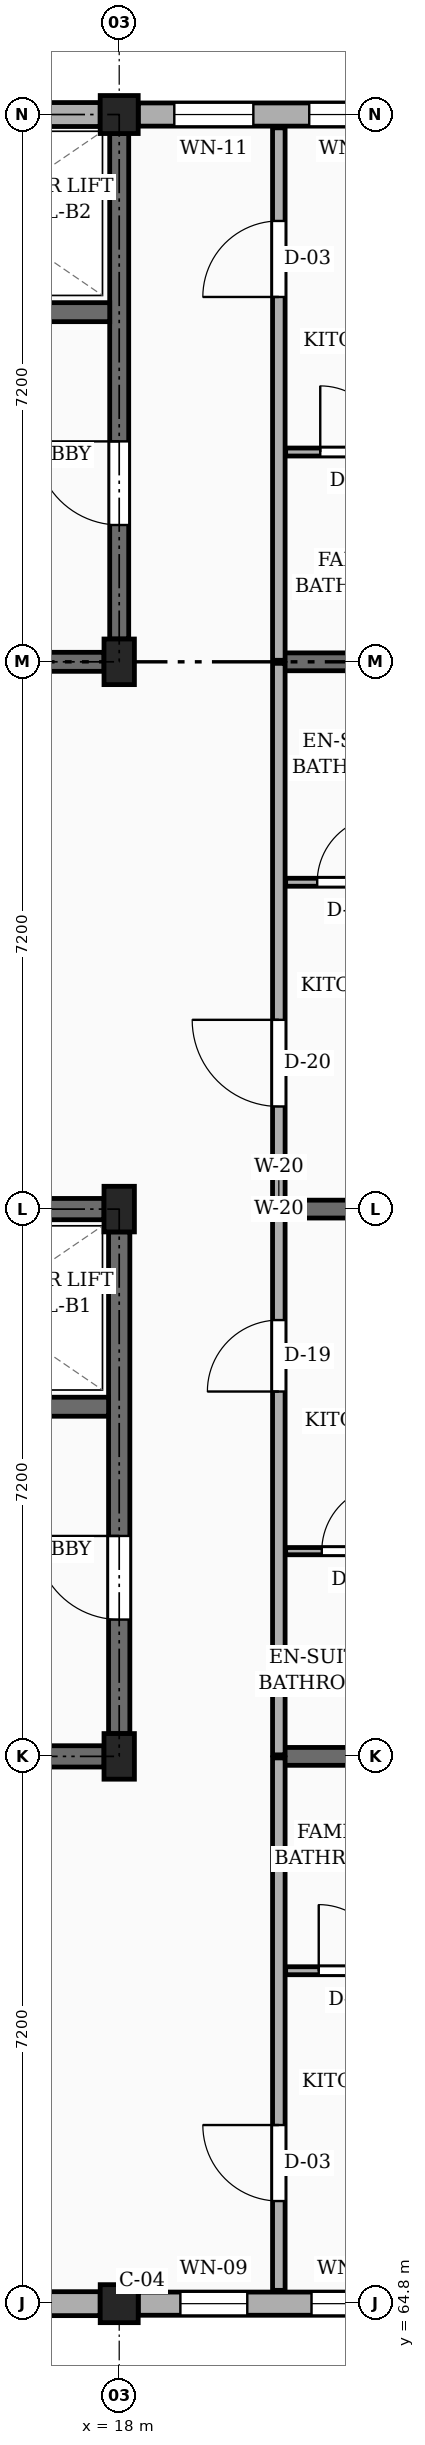
"""IFC4 building model, lengths in metres.
Left out: names, types, materials, properties, quantities, classifications, styles, units other than length and angle.
Written with IfcOpenShell. Run it as: python <this file> out.ifc"""

import sys

from ifc_helpers import new_model, si_unit, direction, frame, frame_2d, origin, origin_2d, place, context, subcontext, project, spatial, rectangle, extrude, element, fill, save


model = new_model("IFC4")
c1 = context("Model", 3, precision=1e-05, world=origin(), true_north=direction((0.0, 1.0)))
c2 = subcontext(c1, "Body", "Model", "MODEL_VIEW")
j1 = project(units=[si_unit("LENGTHUNIT", "METRE"), si_unit("PLANEANGLEUNIT", "RADIAN")], contexts=[c1])
p1 = place(None, origin())
s1 = spatial("IfcSite", under=j1, at=p1, CompositionType="ELEMENT")
p2 = place(p1, origin())
s2 = spatial("IfcBuilding", under=s1, at=p2, CompositionType="ELEMENT")
p3 = place(p2, frame((0.0, 0.0, 23.4)))
s3 = spatial("IfcBuildingStorey", under=s2, at=p3, CompositionType="ELEMENT", Elevation=23.4)
p4 = place(p3, frame((18.0, 64.8, 0.0), z_axis=(0.0, 0.0, 1.0), x_axis=(1.0, 0.0, 0.0)))
e1 = element("IfcColumn", 1, at=p4, inside=s3, PredefinedType="COLUMN", context=c2, shape_type="SweptSolid", body=[
    extrude(rectangle(XDim=0.5, YDim=0.5, at=origin_2d()), origin(), (0.0, 0.0, 1.0), 3.15),
])
for number, where, z_axis, x_axis in (
    (2, (18.0, 72.0, 0.0), (0.0, 0.0, 1.0), (1.0, 0.0, 0.0)),
    (3, (18.0, 79.2, 0.0), (0.0, 0.0, 1.0), (1.0, 0.0, 0.0)),
    (4, (18.0, 86.4, 0.0), (0.0, 0.0, 1.0), (1.0, 0.0, 0.0)),
):
    element("IfcColumn", number, at=place(p3, frame(where, z_axis=z_axis, x_axis=x_axis)), inside=s3, PredefinedType="COLUMN", context=c2, shape_type="SweptSolid", body=[
        extrude(rectangle(XDim=0.4, YDim=0.6, at=origin_2d()), origin(), (0.0, 0.0, 1.0), 3.15),
    ])
p5 = place(p3, frame((18.0, 93.6, 0.0), z_axis=(0.0, 0.0, 1.0), x_axis=(1.0, 0.0, 0.0)))
e5 = element("IfcColumn", 5, at=p5, inside=s3, PredefinedType="COLUMN", context=c2, shape_type="SweptSolid", body=[
    extrude(rectangle(XDim=0.5, YDim=0.5, at=origin_2d()), origin(), (0.0, 0.0, 1.0), 3.15),
])
for number, where, z_axis, x_axis in (
    (6, (20.1, 72.0, 0.0), (0.0, 0.0, 1.0), (1.0, 0.0, 0.0)),
    (7, (20.1, 79.2, 0.0), (0.0, 0.0, 1.0), (1.0, 0.0, 0.0)),
    (8, (20.1, 86.4, 0.0), (0.0, 0.0, 1.0), (1.0, 0.0, 0.0)),
):
    element("IfcWall", number, at=place(p3, frame(where, z_axis=z_axis, x_axis=x_axis)), inside=s3, PredefinedType="SOLIDWALL", context=c2, shape_type="SweptSolid", body=[
        extrude(rectangle(XDim=4.85, YDim=0.235, at=frame_2d((2.425, 0.0))), origin(), (0.0, 0.0, 1.0), 2.21),
    ])
p6 = place(p3, frame((11.05, 64.8, 0.0), z_axis=(0.0, 0.0, 1.0), x_axis=(1.0, 0.0, 0.0)))
e9 = element("IfcWall", 9, at=p6, inside=s3, PredefinedType="SOLIDWALL", context=c2, shape_type="SweptSolid", body=[
    extrude(rectangle(XDim=6.7, YDim=0.315, at=frame_2d((3.35, 0.0))), origin(), (0.0, 0.0, 1.0), 2.48),
])
p7 = place(p6, frame((0.45, 0.0, 0.78)))
e10 = element("IfcOpeningElement", 10, at=p7, cuts=e9, PredefinedType="OPENING", context=c2, shape_type="SweptSolid", body=[
    extrude(rectangle(XDim=1.32, YDim=1.15, at=frame_2d((0.66, 0.575))), frame((0.0, 0.167, 0.0), z_axis=(0.0, -1.0, 0.0), x_axis=(1.0, 0.0, 0.0)), (0.0, 0.0, 1.0), 0.335),
])
p8 = place(p6, frame((4.65, 0.0, 0.78)))
e11 = element("IfcOpeningElement", 11, at=p8, cuts=e9, PredefinedType="OPENING", context=c2, shape_type="SweptSolid", body=[
    extrude(rectangle(XDim=0.88, YDim=1.26, at=frame_2d((0.44, 0.63))), frame((0.0, 0.167, 0.0), z_axis=(0.0, -1.0, 0.0), x_axis=(1.0, 0.0, 0.0)), (0.0, 0.0, 1.0), 0.335),
])
p9 = place(p3, frame((18.25, 64.8, 0.0), z_axis=(0.0, 0.0, 1.0), x_axis=(1.0, 0.0, 0.0)))
e12 = element("IfcWall", 12, at=p9, inside=s3, PredefinedType="SOLIDWALL", context=c2, shape_type="SweptSolid", body=[
    extrude(rectangle(XDim=6.7, YDim=0.305, at=frame_2d((3.35, 0.0))), origin(), (0.0, 0.0, 1.0), 2.48),
])
p10 = place(p9, frame((0.555, 0.0, 0.78)))
e13 = element("IfcOpeningElement", 13, at=p10, cuts=e12, PredefinedType="OPENING", context=c2, shape_type="SweptSolid", body=[
    extrude(rectangle(XDim=0.88, YDim=1.26, at=frame_2d((0.44, 0.63))), frame((0.0, 0.163, 0.0), z_axis=(0.0, -1.0, 0.0), x_axis=(1.0, 0.0, 0.0)), (0.0, 0.0, 1.0), 0.325),
])
p11 = place(p9, frame((2.28, 0.0, 0.78)))
e14 = element("IfcOpeningElement", 14, at=p11, cuts=e12, PredefinedType="OPENING", context=c2, shape_type="SweptSolid", body=[
    extrude(rectangle(XDim=1.04, YDim=1.26, at=frame_2d((0.52, 0.63))), frame((0.0, 0.163, 0.0), z_axis=(0.0, -1.0, 0.0), x_axis=(1.0, 0.0, 0.0)), (0.0, 0.0, 1.0), 0.325),
])
p12 = place(p9, frame((4.555, 0.0, 0.78)))
e15 = element("IfcOpeningElement", 15, at=p12, cuts=e12, PredefinedType="OPENING", context=c2, shape_type="SweptSolid", body=[
    extrude(rectangle(XDim=1.2, YDim=1.26, at=frame_2d((0.6, 0.63))), frame((0.0, 0.163, 0.0), z_axis=(0.0, -1.0, 0.0), x_axis=(1.0, 0.0, 0.0)), (0.0, 0.0, 1.0), 0.325),
])
p13 = place(p3, frame((24.95, 93.6, 0.0), z_axis=(0.0, 0.0, 1.0), x_axis=(-1.0, 0.0, 0.0)))
e16 = element("IfcWall", 16, at=p13, inside=s3, PredefinedType="SOLIDWALL", context=c2, shape_type="SweptSolid", body=[
    extrude(rectangle(XDim=6.7, YDim=0.305, at=frame_2d((3.35, 0.0))), origin(), (0.0, 0.0, 1.0), 2.48),
])
p14 = place(p13, frame((1.035, 0.0, 0.78)))
e17 = element("IfcOpeningElement", 17, at=p14, cuts=e16, PredefinedType="OPENING", context=c2, shape_type="SweptSolid", body=[
    extrude(rectangle(XDim=0.98, YDim=1.36, at=frame_2d((0.49, 0.68))), frame((0.0, 0.163, 0.0), z_axis=(0.0, -1.0, 0.0), x_axis=(1.0, 0.0, 0.0)), (0.0, 0.0, 1.0), 0.325),
])
p15 = place(p13, frame((3.31, 0.0, 0.78)))
e18 = element("IfcOpeningElement", 18, at=p15, cuts=e16, PredefinedType="OPENING", context=c2, shape_type="SweptSolid", body=[
    extrude(rectangle(XDim=1.14, YDim=1.36, at=frame_2d((0.57, 0.68))), frame((0.0, 0.163, 0.0), z_axis=(0.0, -1.0, 0.0), x_axis=(1.0, 0.0, 0.0)), (0.0, 0.0, 1.0), 0.325),
])
p16 = place(p13, frame((5.185, 0.0, 0.78)))
e19 = element("IfcOpeningElement", 19, at=p16, cuts=e16, PredefinedType="OPENING", context=c2, shape_type="SweptSolid", body=[
    extrude(rectangle(XDim=1.04, YDim=1.26, at=frame_2d((0.52, 0.63))), frame((0.0, 0.163, 0.0), z_axis=(0.0, -1.0, 0.0), x_axis=(1.0, 0.0, 0.0)), (0.0, 0.0, 1.0), 0.325),
])
p17 = place(p3, frame((17.75, 93.6, 0.0), z_axis=(0.0, 0.0, 1.0), x_axis=(-1.0, 0.0, 0.0)))
e20 = element("IfcWall", 20, at=p17, inside=s3, PredefinedType="SOLIDWALL", context=c2, shape_type="SweptSolid", body=[
    extrude(rectangle(XDim=6.7, YDim=0.315, at=frame_2d((3.35, 0.0))), origin(), (0.0, 0.0, 1.0), 2.48),
])
p18 = place(p17, frame((2.925, 0.0, 0.9)))
e21 = element("IfcOpeningElement", 21, at=p18, cuts=e20, PredefinedType="OPENING", context=c2, shape_type="SweptSolid", body=[
    extrude(rectangle(XDim=0.85, YDim=1.15, at=frame_2d((0.425, 0.575))), frame((0.0, 0.167, 0.0), z_axis=(0.0, -1.0, 0.0), x_axis=(1.0, 0.0, 0.0)), (0.0, 0.0, 1.0), 0.335),
])
p19 = place(p3, frame((11.0, 79.2, 0.0), z_axis=(0.0, 0.0, 1.0), x_axis=(1.0, 0.0, 0.0)))
e22 = element("IfcWall", 22, at=p19, inside=s3, PredefinedType="SHEAR", context=c2, shape_type="SweptSolid", body=[
    extrude(rectangle(XDim=6.8, YDim=0.28, at=frame_2d((3.4, 0.0))), origin(), (0.0, 0.0, 1.0), 2.91),
])
p20 = place(p3, frame((18.0, 72.3, 0.0), z_axis=(0.0, 0.0, 1.0), x_axis=(0.0, 1.0, 0.0)))
e23 = element("IfcWall", 23, at=p20, inside=s3, PredefinedType="SHEAR", context=c2, shape_type="SweptSolid", body=[
    extrude(rectangle(XDim=6.6, YDim=0.28, at=frame_2d((3.3, 0.0))), origin(), (0.0, 0.0, 1.0), 2.91),
])
p21 = place(p20, frame((1.5, 0.0, 0.0)))
e24 = element("IfcOpeningElement", 24, at=p21, cuts=e23, PredefinedType="OPENING", context=c2, shape_type="SweptSolid", body=[
    extrude(rectangle(XDim=1.1, YDim=2.15, at=frame_2d((0.55, 1.075))), frame((0.0, 0.15, 0.0), z_axis=(0.0, -1.0, 0.0), x_axis=(1.0, 0.0, 0.0)), (0.0, 0.0, 1.0), 0.3),
])
p22 = place(p3, frame((11.0, 72.0, 0.0), z_axis=(0.0, 0.0, 1.0), x_axis=(1.0, 0.0, 0.0)))
e25 = element("IfcWall", 25, at=p22, inside=s3, PredefinedType="SHEAR", context=c2, shape_type="SweptSolid", body=[
    extrude(rectangle(XDim=6.8, YDim=0.28, at=frame_2d((3.4, 0.0))), origin(), (0.0, 0.0, 1.0), 2.91),
])
p23 = place(p3, frame((14.525, 76.6, 0.0), z_axis=(0.0, 0.0, 1.0), x_axis=(1.0, 0.0, 0.0)))
e26 = element("IfcWall", 26, at=p23, inside=s3, PredefinedType="SHEAR", context=c2, shape_type="SweptSolid", body=[
    extrude(rectangle(XDim=3.335, YDim=0.25, at=frame_2d((1.667, 0.0))), origin(), (0.0, 0.0, 1.0), 2.91),
])
p24 = place(p23, frame((1.1, 0.0, 0.0)))
e27 = element("IfcOpeningElement", 27, at=p24, cuts=e26, PredefinedType="OPENING", context=c2, shape_type="SweptSolid", body=[
    extrude(rectangle(XDim=1.0, YDim=2.2, at=frame_2d((0.5, 1.1))), frame((0.0, 0.135, 0.0), z_axis=(0.0, -1.0, 0.0), x_axis=(1.0, 0.0, 0.0)), (0.0, 0.0, 1.0), 0.27),
])
p25 = place(p3, frame((18.0, 86.7, 0.0), z_axis=(0.0, 0.0, 1.0), x_axis=(0.0, 1.0, 0.0)))
e28 = element("IfcWall", 28, at=p25, inside=s3, PredefinedType="SHEAR", context=c2, shape_type="SweptSolid", body=[
    extrude(rectangle(XDim=6.65, YDim=0.25, at=frame_2d((3.325, 0.0))), origin(), (0.0, 0.0, 1.0), 2.91),
])
p26 = place(p25, frame((1.5, 0.0, 0.0)))
e29 = element("IfcOpeningElement", 29, at=p26, cuts=e28, PredefinedType="OPENING", context=c2, shape_type="SweptSolid", body=[
    extrude(rectangle(XDim=1.1, YDim=2.15, at=frame_2d((0.55, 1.075))), frame((0.0, 0.135, 0.0), z_axis=(0.0, -1.0, 0.0), x_axis=(1.0, 0.0, 0.0)), (0.0, 0.0, 1.0), 0.27),
])
p27 = place(p3, frame((11.0, 86.4, 0.0), z_axis=(0.0, 0.0, 1.0), x_axis=(1.0, 0.0, 0.0)))
e30 = element("IfcWall", 30, at=p27, inside=s3, PredefinedType="SHEAR", context=c2, shape_type="SweptSolid", body=[
    extrude(rectangle(XDim=6.8, YDim=0.25, at=frame_2d((3.4, 0.0))), origin(), (0.0, 0.0, 1.0), 2.91),
])
p28 = place(p3, frame((14.525, 91.0, 0.0), z_axis=(0.0, 0.0, 1.0), x_axis=(1.0, 0.0, 0.0)))
e31 = element("IfcWall", 31, at=p28, inside=s3, PredefinedType="SHEAR", context=c2, shape_type="SweptSolid", body=[
    extrude(rectangle(XDim=3.35, YDim=0.25, at=frame_2d((1.675, 0.0))), origin(), (0.0, 0.0, 1.0), 2.91),
])
p29 = place(p28, frame((1.1, 0.0, 0.0)))
e32 = element("IfcOpeningElement", 32, at=p29, cuts=e31, PredefinedType="OPENING", context=c2, shape_type="SweptSolid", body=[
    extrude(rectangle(XDim=1.0, YDim=2.2, at=frame_2d((0.5, 1.1))), frame((0.0, 0.135, 0.0), z_axis=(0.0, -1.0, 0.0), x_axis=(1.0, 0.0, 0.0)), (0.0, 0.0, 1.0), 0.27),
])
p30 = place(p3, frame((20.1, 64.975, 0.0), z_axis=(0.0, 0.0, 1.0), x_axis=(0.0, 1.0, 0.0)))
e33 = element("IfcWall", 33, at=p30, inside=s3, PredefinedType="PARTITIONING", context=c2, shape_type="SweptSolid", body=[
    extrude(rectangle(XDim=7.005, YDim=0.165, at=frame_2d((3.502, 0.0))), origin(), (0.0, 0.0, 1.0), 2.345),
])
p31 = place(p30, frame((1.175, 0.0, 0.0)))
e34 = element("IfcOpeningElement", 34, at=p31, cuts=e33, PredefinedType="OPENING", context=c2, shape_type="SweptSolid", body=[
    extrude(rectangle(XDim=1.0, YDim=2.15, at=frame_2d((0.5, 1.075))), frame((0.0, 0.093, 0.0), z_axis=(0.0, -1.0, 0.0), x_axis=(1.0, 0.0, 0.0)), (0.0, 0.0, 1.0), 0.185),
])
p32 = place(p3, frame((20.1, 72.02, 0.0), z_axis=(0.0, 0.0, 1.0), x_axis=(0.0, 1.0, 0.0)))
e35 = element("IfcWall", 35, at=p32, inside=s3, PredefinedType="PARTITIONING", context=c2, shape_type="SweptSolid", body=[
    extrude(rectangle(XDim=7.16, YDim=0.165, at=frame_2d((3.58, 0.0))), origin(), (0.0, 0.0, 1.0), 2.345),
])
p33 = place(p32, frame((4.78, 0.0, 0.0)))
e36 = element("IfcOpeningElement", 36, at=p33, cuts=e35, PredefinedType="OPENING", context=c2, shape_type="SweptSolid", body=[
    extrude(rectangle(XDim=0.94, YDim=2.12, at=frame_2d((0.47, 1.06))), frame((0.0, 0.093, 0.0), z_axis=(0.0, -1.0, 0.0), x_axis=(1.0, 0.0, 0.0)), (0.0, 0.0, 1.0), 0.185),
])
p34 = place(p3, frame((20.1, 79.22, 0.0), z_axis=(0.0, 0.0, 1.0), x_axis=(0.0, 1.0, 0.0)))
e37 = element("IfcWall", 37, at=p34, inside=s3, PredefinedType="PARTITIONING", context=c2, shape_type="SweptSolid", body=[
    extrude(rectangle(XDim=7.16, YDim=0.165, at=frame_2d((3.58, 0.0))), origin(), (0.0, 0.0, 1.0), 2.345),
])
p35 = place(p34, frame((1.33, 0.0, 0.0)))
e38 = element("IfcOpeningElement", 38, at=p35, cuts=e37, PredefinedType="OPENING", context=c2, shape_type="SweptSolid", body=[
    extrude(rectangle(XDim=1.14, YDim=2.18, at=frame_2d((0.57, 1.09))), frame((0.0, 0.093, 0.0), z_axis=(0.0, -1.0, 0.0), x_axis=(1.0, 0.0, 0.0)), (0.0, 0.0, 1.0), 0.185),
])
p36 = place(p3, frame((20.1, 86.42, 0.0), z_axis=(0.0, 0.0, 1.0), x_axis=(0.0, 1.0, 0.0)))
e39 = element("IfcWall", 39, at=p36, inside=s3, PredefinedType="PARTITIONING", context=c2, shape_type="SweptSolid", body=[
    extrude(rectangle(XDim=7.005, YDim=0.165, at=frame_2d((3.502, 0.0))), origin(), (0.0, 0.0, 1.0), 2.345),
])
p37 = place(p36, frame((4.78, 0.0, 0.0)))
e40 = element("IfcOpeningElement", 40, at=p37, cuts=e39, PredefinedType="OPENING", context=c2, shape_type="SweptSolid", body=[
    extrude(rectangle(XDim=1.0, YDim=2.15, at=frame_2d((0.5, 1.075))), frame((0.0, 0.093, 0.0), z_axis=(0.0, -1.0, 0.0), x_axis=(1.0, 0.0, 0.0)), (0.0, 0.0, 1.0), 0.185),
])
p38 = place(p3, frame((20.19, 69.18, 0.0), z_axis=(0.0, 0.0, 1.0), x_axis=(1.0, 0.0, 0.0)))
e41 = element("IfcWall", 41, at=p38, inside=s3, PredefinedType="PARTITIONING", context=c2, shape_type="SweptSolid", body=[
    extrude(rectangle(XDim=1.74, YDim=0.105, at=frame_2d((0.87, 0.0))), origin(), (0.0, 0.0, 1.0), 2.345),
])
p39 = place(p38, frame((0.435, 0.0, 0.0)))
e42 = element("IfcOpeningElement", 42, at=p39, cuts=e41, PredefinedType="OPENING", context=c2, shape_type="SweptSolid", body=[
    extrude(rectangle(XDim=0.87, YDim=2.05, at=frame_2d((0.435, 1.025))), frame((0.0, 0.062, 0.0), z_axis=(0.0, -1.0, 0.0), x_axis=(1.0, 0.0, 0.0)), (0.0, 0.0, 1.0), 0.125),
])
p40 = place(p3, frame((20.19, 74.7, 0.0), z_axis=(0.0, 0.0, 1.0), x_axis=(1.0, 0.0, 0.0)))
e43 = element("IfcWall", 43, at=p40, inside=s3, PredefinedType="PARTITIONING", context=c2, shape_type="SweptSolid", body=[
    extrude(rectangle(XDim=1.82, YDim=0.095, at=frame_2d((0.91, 0.0))), origin(), (0.0, 0.0, 1.0), 2.345),
])
p41 = place(p40, frame((0.475, 0.0, 0.0)))
e44 = element("IfcOpeningElement", 44, at=p41, cuts=e43, PredefinedType="OPENING", context=c2, shape_type="SweptSolid", body=[
    extrude(rectangle(XDim=0.87, YDim=2.05, at=frame_2d((0.435, 1.025))), frame((0.0, 0.058, 0.0), z_axis=(0.0, -1.0, 0.0), x_axis=(1.0, 0.0, 0.0)), (0.0, 0.0, 1.0), 0.115),
])
p42 = place(p3, frame((20.19, 83.5, 0.0), z_axis=(0.0, 0.0, 1.0), x_axis=(1.0, 0.0, 0.0)))
e45 = element("IfcWall", 45, at=p42, inside=s3, PredefinedType="PARTITIONING", context=c2, shape_type="SweptSolid", body=[
    extrude(rectangle(XDim=1.7, YDim=0.105, at=frame_2d((0.85, 0.0))), origin(), (0.0, 0.0, 1.0), 2.345),
])
p43 = place(p42, frame((0.415, 0.0, 0.0)))
e46 = element("IfcOpeningElement", 46, at=p43, cuts=e45, PredefinedType="OPENING", context=c2, shape_type="SweptSolid", body=[
    extrude(rectangle(XDim=0.87, YDim=2.05, at=frame_2d((0.435, 1.025))), frame((0.0, 0.062, 0.0), z_axis=(0.0, -1.0, 0.0), x_axis=(1.0, 0.0, 0.0)), (0.0, 0.0, 1.0), 0.125),
])
p44 = place(p3, frame((20.19, 89.16, 0.0), z_axis=(0.0, 0.0, 1.0), x_axis=(1.0, 0.0, 0.0)))
e47 = element("IfcWall", 47, at=p44, inside=s3, PredefinedType="PARTITIONING", context=c2, shape_type="SweptSolid", body=[
    extrude(rectangle(XDim=1.78, YDim=0.105, at=frame_2d((0.89, 0.0))), origin(), (0.0, 0.0, 1.0), 2.345),
])
p45 = place(p44, frame((0.455, 0.0, 0.0)))
e48 = element("IfcOpeningElement", 48, at=p45, cuts=e47, PredefinedType="OPENING", context=c2, shape_type="SweptSolid", body=[
    extrude(rectangle(XDim=0.87, YDim=2.05, at=frame_2d((0.435, 1.025))), frame((0.0, 0.062, 0.0), z_axis=(0.0, -1.0, 0.0), x_axis=(1.0, 0.0, 0.0)), (0.0, 0.0, 1.0), 0.125),
])
p46 = place(p10, origin())
e49 = element("IfcWindow", 49, at=p46, inside=s3, PartitioningType="SINGLE_PANEL", PredefinedType="WINDOW", context=c2, shape_type="SweptSolid", body=[
    extrude(rectangle(XDim=0.88, YDim=1.26, at=frame_2d((0.44, 0.63))), frame((0.0, 0.03, 0.0), z_axis=(0.0, -1.0, 0.0), x_axis=(1.0, 0.0, 0.0)), (0.0, 0.0, 1.0), 0.06),
])
fill(e13, e49)
p47 = place(p11, origin())
e50 = element("IfcWindow", 50, at=p47, inside=s3, PartitioningType="SINGLE_PANEL", PredefinedType="WINDOW", context=c2, shape_type="SweptSolid", body=[
    extrude(rectangle(XDim=1.04, YDim=1.26, at=frame_2d((0.52, 0.63))), frame((0.0, 0.03, 0.0), z_axis=(0.0, -1.0, 0.0), x_axis=(1.0, 0.0, 0.0)), (0.0, 0.0, 1.0), 0.06),
])
fill(e14, e50)
p48 = place(p15, origin())
e51 = element("IfcWindow", 51, at=p48, inside=s3, PartitioningType="SINGLE_PANEL", PredefinedType="WINDOW", context=c2, shape_type="SweptSolid", body=[
    extrude(rectangle(XDim=1.14, YDim=1.36, at=frame_2d((0.57, 0.68))), frame((0.0, 0.03, 0.0), z_axis=(0.0, -1.0, 0.0), x_axis=(1.0, 0.0, 0.0)), (0.0, 0.0, 1.0), 0.06),
])
fill(e18, e51)
p49 = place(p16, origin())
e52 = element("IfcWindow", 52, at=p49, inside=s3, PartitioningType="SINGLE_PANEL", PredefinedType="WINDOW", context=c2, shape_type="SweptSolid", body=[
    extrude(rectangle(XDim=1.04, YDim=1.26, at=frame_2d((0.52, 0.63))), frame((0.0, 0.03, 0.0), z_axis=(0.0, -1.0, 0.0), x_axis=(1.0, 0.0, 0.0)), (0.0, 0.0, 1.0), 0.06),
])
fill(e19, e52)
p50 = place(p21, frame((1.1, 0.0, 0.0), z_axis=(0.0, 0.0, 1.0), x_axis=(-1.0, 0.0, 0.0)))
e53 = element("IfcDoor", 53, at=p50, inside=s3, OperationType="SINGLE_SWING_RIGHT", PredefinedType="DOOR", context=c2, shape_type="SweptSolid", body=[
    extrude(rectangle(XDim=1.1, YDim=2.15, at=frame_2d((0.55, 1.075))), frame((0.0, 0.025, 0.0), z_axis=(0.0, -1.0, 0.0), x_axis=(1.0, 0.0, 0.0)), (0.0, 0.0, 1.0), 0.05),
])
fill(e24, e53)
p51 = place(p26, frame((1.1, 0.0, 0.0), z_axis=(0.0, 0.0, 1.0), x_axis=(-1.0, 0.0, 0.0)))
e54 = element("IfcDoor", 54, at=p51, inside=s3, OperationType="SINGLE_SWING_RIGHT", PredefinedType="DOOR", context=c2, shape_type="SweptSolid", body=[
    extrude(rectangle(XDim=1.1, YDim=2.15, at=frame_2d((0.55, 1.075))), frame((0.0, 0.025, 0.0), z_axis=(0.0, -1.0, 0.0), x_axis=(1.0, 0.0, 0.0)), (0.0, 0.0, 1.0), 0.05),
])
fill(e29, e54)
p52 = place(p31, origin())
e55 = element("IfcDoor", 55, at=p52, inside=s3, OperationType="SINGLE_SWING_RIGHT", PredefinedType="DOOR", context=c2, shape_type="SweptSolid", body=[
    extrude(rectangle(XDim=1.0, YDim=2.15, at=frame_2d((0.5, 1.075))), frame((0.0, 0.025, 0.0), z_axis=(0.0, -1.0, 0.0), x_axis=(1.0, 0.0, 0.0)), (0.0, 0.0, 1.0), 0.05),
])
fill(e34, e55)
p53 = place(p33, origin())
e56 = element("IfcDoor", 56, at=p53, inside=s3, OperationType="SINGLE_SWING_LEFT", PredefinedType="DOOR", context=c2, shape_type="SweptSolid", body=[
    extrude(rectangle(XDim=0.94, YDim=2.12, at=frame_2d((0.47, 1.06))), frame((0.0, 0.025, 0.0), z_axis=(0.0, -1.0, 0.0), x_axis=(1.0, 0.0, 0.0)), (0.0, 0.0, 1.0), 0.05),
])
fill(e36, e56)
p54 = place(p35, origin())
e57 = element("IfcDoor", 57, at=p54, inside=s3, OperationType="SINGLE_SWING_RIGHT", PredefinedType="DOOR", context=c2, shape_type="SweptSolid", body=[
    extrude(rectangle(XDim=1.14, YDim=2.18, at=frame_2d((0.57, 1.09))), frame((0.0, 0.025, 0.0), z_axis=(0.0, -1.0, 0.0), x_axis=(1.0, 0.0, 0.0)), (0.0, 0.0, 1.0), 0.05),
])
fill(e38, e57)
p55 = place(p37, origin())
e58 = element("IfcDoor", 58, at=p55, inside=s3, OperationType="SINGLE_SWING_LEFT", PredefinedType="DOOR", context=c2, shape_type="SweptSolid", body=[
    extrude(rectangle(XDim=1.0, YDim=2.15, at=frame_2d((0.5, 1.075))), frame((0.0, 0.025, 0.0), z_axis=(0.0, -1.0, 0.0), x_axis=(1.0, 0.0, 0.0)), (0.0, 0.0, 1.0), 0.05),
])
fill(e40, e58)
p56 = place(p39, origin())
e59 = element("IfcDoor", 59, at=p56, inside=s3, OperationType="SINGLE_SWING_LEFT", PredefinedType="DOOR", context=c2, shape_type="SweptSolid", body=[
    extrude(rectangle(XDim=0.87, YDim=2.05, at=frame_2d((0.435, 1.025))), frame((0.0, 0.025, 0.0), z_axis=(0.0, -1.0, 0.0), x_axis=(1.0, 0.0, 0.0)), (0.0, 0.0, 1.0), 0.05),
])
fill(e42, e59)
p57 = place(p41, origin())
e60 = element("IfcDoor", 60, at=p57, inside=s3, OperationType="SINGLE_SWING_RIGHT", PredefinedType="DOOR", context=c2, shape_type="SweptSolid", body=[
    extrude(rectangle(XDim=0.87, YDim=2.05, at=frame_2d((0.435, 1.025))), frame((0.0, 0.025, 0.0), z_axis=(0.0, -1.0, 0.0), x_axis=(1.0, 0.0, 0.0)), (0.0, 0.0, 1.0), 0.05),
])
fill(e44, e60)
p58 = place(p43, origin())
e61 = element("IfcDoor", 61, at=p58, inside=s3, OperationType="SINGLE_SWING_RIGHT", PredefinedType="DOOR", context=c2, shape_type="SweptSolid", body=[
    extrude(rectangle(XDim=0.87, YDim=2.05, at=frame_2d((0.435, 1.025))), frame((0.0, 0.025, 0.0), z_axis=(0.0, -1.0, 0.0), x_axis=(1.0, 0.0, 0.0)), (0.0, 0.0, 1.0), 0.05),
])
fill(e46, e61)
p59 = place(p45, origin())
e62 = element("IfcDoor", 62, at=p59, inside=s3, OperationType="SINGLE_SWING_LEFT", PredefinedType="DOOR", context=c2, shape_type="SweptSolid", body=[
    extrude(rectangle(XDim=0.87, YDim=2.05, at=frame_2d((0.435, 1.025))), frame((0.0, 0.025, 0.0), z_axis=(0.0, -1.0, 0.0), x_axis=(1.0, 0.0, 0.0)), (0.0, 0.0, 1.0), 0.05),
])
fill(e48, e62)
save(model, sys.argv[1])
